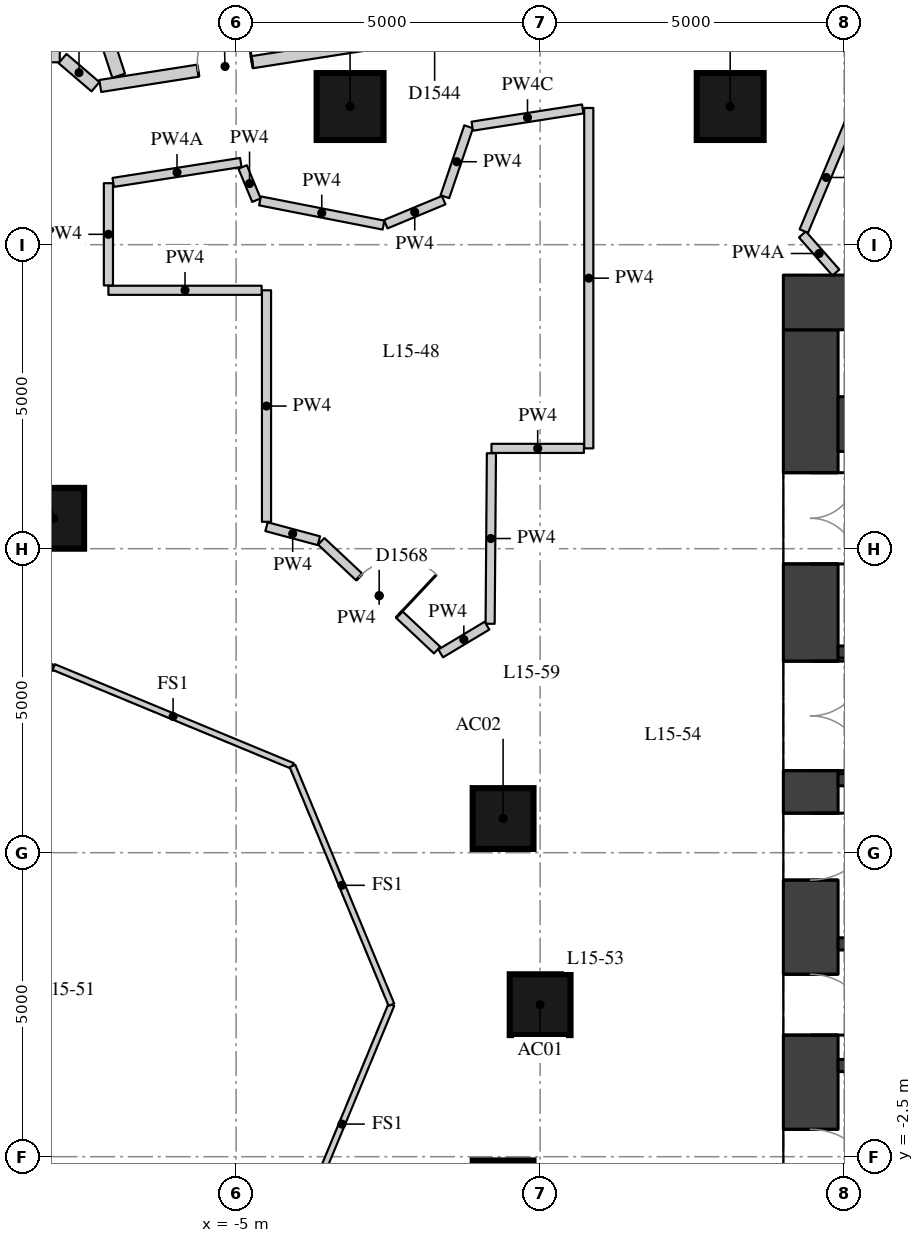
"""IFC4 building model, lengths in metres.
Left out: names, types, materials, properties, quantities, classifications, styles, units other than length and angle.
Written with IfcOpenShell. Run it as: python <this file> out.ifc"""

import sys

from ifc_helpers import new_model, si_unit, direction, frame, frame_2d, origin, origin_2d, place, context, subcontext, project, spatial, rectangle, extrude, element, fill, save


model = new_model("IFC4")
c1 = context("Model", 3, precision=1e-05, world=origin(), true_north=direction((0.0, 1.0)))
c2 = subcontext(c1, "Body", "Model", "MODEL_VIEW")
j1 = project(units=[si_unit("LENGTHUNIT", "METRE"), si_unit("PLANEANGLEUNIT", "RADIAN")], contexts=[c1])
p1 = place(None, origin())
s1 = spatial("IfcSite", under=j1, at=p1, CompositionType="ELEMENT")
p2 = place(p1, origin())
s2 = spatial("IfcBuilding", under=s1, at=p2, CompositionType="ELEMENT")
p3 = place(p2, frame((0.0, 0.0, 58.0)))
s3 = spatial("IfcBuildingStorey", under=s2, at=p3, CompositionType="ELEMENT", Elevation=58.0)
for number, where, z_axis, x_axis in (
    (1, (0.0, 0.0, 0.0), (0.0, 0.0, 1.0), (1.0, 0.0, 0.0)),
    (2, (-0.609, 3.062, 0.0), (0.0, 0.0, 1.0), (1.0, 0.0, 0.0)),
    (3, (-8.0, 8.0, 0.0), (0.0, 0.0, 1.0), (1.0, 0.0, 0.0)),
    (4, (-0.609, -3.062, 0.0), (0.0, 0.0, 1.0), (1.0, 0.0, 0.0)),
):
    element("IfcColumn", number, at=place(p3, frame(where, z_axis=z_axis, x_axis=x_axis)), inside=s3, PredefinedType="COLUMN", context=c2, shape_type="SweptSolid", body=[
        extrude(rectangle(XDim=1.0, YDim=1.0, at=origin_2d()), origin(), (0.0, 0.0, 1.0), 3.3),
    ])
for number, where, z_axis, x_axis in (
    (5, (3.126, 14.772, 0.0), (0.0, 0.0, 1.0), (1.0, 0.0, 0.0)),
    (6, (-3.126, 14.772, 0.0), (0.0, 0.0, 1.0), (1.0, 0.0, 0.0)),
):
    element("IfcColumn", number, at=place(p3, frame(where, z_axis=z_axis, x_axis=x_axis)), inside=s3, PredefinedType="COLUMN", context=c2, shape_type="SweptSolid", body=[
        extrude(rectangle(XDim=1.1, YDim=1.1, at=origin_2d()), origin(), (0.0, 0.0, 1.0), 3.3),
    ])
p4 = place(p3, frame((4.45, -11.1, 0.0), z_axis=(0.0, 0.0, 1.0), x_axis=(0.0, 1.0, 0.0)))
e7 = element("IfcWall", 7, at=p4, inside=s3, PredefinedType="SHEAR", context=c2, shape_type="SweptSolid", body=[
    extrude(rectangle(XDim=22.2, YDim=0.9, at=frame_2d((11.1, 0.0))), origin(), (0.0, 0.0, 1.0), 3.02),
])
p5 = place(p4, frame((2.35, 0.0, 0.0)))
e8 = element("IfcOpeningElement", 8, at=p5, cuts=e7, PredefinedType="OPENING", context=c2, shape_type="SweptSolid", body=[
    extrude(rectangle(XDim=1.5, YDim=2.1, at=frame_2d((0.75, 1.05))), frame((0.0, 0.46, 0.0), z_axis=(0.0, -1.0, 0.0), x_axis=(1.0, 0.0, 0.0)), (0.0, 0.0, 1.0), 0.92),
])
p6 = place(p4, frame((5.45, 0.0, 0.0)))
e9 = element("IfcOpeningElement", 9, at=p6, cuts=e7, PredefinedType="OPENING", context=c2, shape_type="SweptSolid", body=[
    extrude(rectangle(XDim=1.8, YDim=2.1, at=frame_2d((0.9, 1.05))), frame((0.0, 0.46, 0.0), z_axis=(0.0, -1.0, 0.0), x_axis=(1.0, 0.0, 0.0)), (0.0, 0.0, 1.0), 0.92),
])
p7 = place(p4, frame((7.95, 0.0, 0.0)))
e10 = element("IfcOpeningElement", 10, at=p7, cuts=e7, PredefinedType="OPENING", context=c2, shape_type="SweptSolid", body=[
    extrude(rectangle(XDim=1.1, YDim=2.1, at=frame_2d((0.55, 1.05))), frame((0.0, 0.46, 0.0), z_axis=(0.0, -1.0, 0.0), x_axis=(1.0, 0.0, 0.0)), (0.0, 0.0, 1.0), 0.92),
])
p8 = place(p4, frame((10.6, 0.0, 0.0)))
e11 = element("IfcOpeningElement", 11, at=p8, cuts=e7, PredefinedType="OPENING", context=c2, shape_type="SweptSolid", body=[
    extrude(rectangle(XDim=1.0, YDim=2.1, at=frame_2d((0.5, 1.05))), frame((0.0, 0.46, 0.0), z_axis=(0.0, -1.0, 0.0), x_axis=(1.0, 0.0, 0.0)), (0.0, 0.0, 1.0), 0.92),
])
p9 = place(p4, frame((13.15, 0.0, 0.0)))
e12 = element("IfcOpeningElement", 12, at=p9, cuts=e7, PredefinedType="OPENING", context=c2, shape_type="SweptSolid", body=[
    extrude(rectangle(XDim=1.1, YDim=2.1, at=frame_2d((0.55, 1.05))), frame((0.0, 0.46, 0.0), z_axis=(0.0, -1.0, 0.0), x_axis=(1.0, 0.0, 0.0)), (0.0, 0.0, 1.0), 0.92),
])
p10 = place(p4, frame((14.95, 0.0, 0.0)))
e13 = element("IfcOpeningElement", 13, at=p10, cuts=e7, PredefinedType="OPENING", context=c2, shape_type="SweptSolid", body=[
    extrude(rectangle(XDim=1.8, YDim=2.1, at=frame_2d((0.9, 1.05))), frame((0.0, 0.46, 0.0), z_axis=(0.0, -1.0, 0.0), x_axis=(1.0, 0.0, 0.0)), (0.0, 0.0, 1.0), 0.92),
])
p11 = place(p4, frame((18.35, 0.0, 0.0)))
e14 = element("IfcOpeningElement", 14, at=p11, cuts=e7, PredefinedType="OPENING", context=c2, shape_type="SweptSolid", body=[
    extrude(rectangle(XDim=1.5, YDim=2.1, at=frame_2d((0.75, 1.05))), frame((0.0, 0.46, 0.0), z_axis=(0.0, -1.0, 0.0), x_axis=(1.0, 0.0, 0.0)), (0.0, 0.0, 1.0), 0.92),
])
p12 = place(p3, frame((4.0, 11.55, 0.0), z_axis=(0.0, 0.0, 1.0), x_axis=(1.0, 0.0, 0.0)))
e15 = element("IfcWall", 15, at=p12, inside=s3, PredefinedType="SHEAR", context=c2, shape_type="SweptSolid", body=[
    extrude(rectangle(XDim=15.2, YDim=0.9, at=frame_2d((7.6, 0.0))), origin(), (0.0, 0.0, 1.0), 3.02),
])
p13 = place(p3, frame((4.9, 9.55, 0.0), z_axis=(0.0, 0.0, 1.0), x_axis=(1.0, 0.0, 0.0)))
e16 = element("IfcWall", 16, at=p13, inside=s3, PredefinedType="SHEAR", context=c2, shape_type="SweptSolid", body=[
    extrude(rectangle(XDim=10.2, YDim=0.9, at=frame_2d((5.1, 0.0))), origin(), (0.0, 0.0, 1.0), 3.02),
])
p14 = place(p3, frame((4.9, 5.8, 0.0), z_axis=(0.0, 0.0, 1.0), x_axis=(1.0, 0.0, 0.0)))
e17 = element("IfcWall", 17, at=p14, inside=s3, PredefinedType="SHEAR", context=c2, shape_type="SweptSolid", body=[
    extrude(rectangle(XDim=10.2, YDim=0.2, at=frame_2d((5.1, 0.0))), origin(), (0.0, 0.0, 1.0), 3.02),
])
p15 = place(p14, frame((6.75, 0.0, 0.0)))
e18 = element("IfcOpeningElement", 18, at=p15, cuts=e17, PredefinedType="OPENING", context=c2, shape_type="SweptSolid", body=[
    extrude(rectangle(XDim=1.1, YDim=2.1, at=frame_2d((0.55, 1.05))), frame((0.0, 0.11, 0.0), z_axis=(0.0, -1.0, 0.0), x_axis=(1.0, 0.0, 0.0)), (0.0, 0.0, 1.0), 0.22),
])
p16 = place(p14, frame((8.75, 0.0, 0.0)))
e19 = element("IfcOpeningElement", 19, at=p16, cuts=e17, PredefinedType="OPENING", context=c2, shape_type="SweptSolid", body=[
    extrude(rectangle(XDim=1.1, YDim=2.1, at=frame_2d((0.55, 1.05))), frame((0.0, 0.11, 0.0), z_axis=(0.0, -1.0, 0.0), x_axis=(1.0, 0.0, 0.0)), (0.0, 0.0, 1.0), 0.22),
])
p17 = place(p3, frame((4.9, 3.7, 0.0), z_axis=(0.0, 0.0, 1.0), x_axis=(1.0, 0.0, 0.0)))
e20 = element("IfcWall", 20, at=p17, inside=s3, PredefinedType="SHEAR", context=c2, shape_type="SweptSolid", body=[
    extrude(rectangle(XDim=10.2, YDim=0.2, at=frame_2d((5.1, 0.0))), origin(), (0.0, 0.0, 1.0), 3.02),
])
p18 = place(p17, frame((6.3, 0.0, 0.0)))
e21 = element("IfcOpeningElement", 21, at=p18, cuts=e20, PredefinedType="OPENING", context=c2, shape_type="SweptSolid", body=[
    extrude(rectangle(XDim=1.1, YDim=2.1, at=frame_2d((0.55, 1.05))), frame((0.0, 0.11, 0.0), z_axis=(0.0, -1.0, 0.0), x_axis=(1.0, 0.0, 0.0)), (0.0, 0.0, 1.0), 0.22),
])
p19 = place(p17, frame((8.6, 0.0, 0.0)))
e22 = element("IfcOpeningElement", 22, at=p19, cuts=e20, PredefinedType="OPENING", context=c2, shape_type="SweptSolid", body=[
    extrude(rectangle(XDim=1.1, YDim=2.1, at=frame_2d((0.55, 1.05))), frame((0.0, 0.11, 0.0), z_axis=(0.0, -1.0, 0.0), x_axis=(1.0, 0.0, 0.0)), (0.0, 0.0, 1.0), 0.22),
])
for number, where, z_axis, x_axis in (
    (23, (4.9, 1.0, 0.0), (0.0, 0.0, 1.0), (1.0, 0.0, 0.0)),
    (24, (4.9, -1.0, 0.0), (0.0, 0.0, 1.0), (1.0, 0.0, 0.0)),
):
    element("IfcWall", number, at=place(p3, frame(where, z_axis=z_axis, x_axis=x_axis)), inside=s3, PredefinedType="SHEAR", context=c2, shape_type="SweptSolid", body=[
        extrude(rectangle(XDim=10.2, YDim=0.2, at=frame_2d((5.1, 0.0))), origin(), (0.0, 0.0, 1.0), 3.02),
    ])
p20 = place(p3, frame((-15.531, 15.6, 0.0), z_axis=(0.0, 0.0, 1.0), x_axis=(1.0, 0.0, 0.0)))
e25 = element("IfcWall", 25, at=p20, inside=s3, PredefinedType="PARTITIONING", context=c2, shape_type="SweptSolid", body=[
    extrude(rectangle(XDim=7.632, YDim=0.2, at=frame_2d((3.816, 0.0))), origin(), (0.0, 0.0, 1.0), 3.02),
])
p21 = place(p20, frame((5.283, 0.0, 0.0)))
e26 = element("IfcOpeningElement", 26, at=p21, cuts=e25, PredefinedType="OPENING", context=c2, shape_type="SweptSolid", body=[
    extrude(rectangle(XDim=1.0, YDim=2.1, at=frame_2d((0.5, 1.05))), frame((0.0, 0.11, 0.0), z_axis=(0.0, -1.0, 0.0), x_axis=(1.0, 0.0, 0.0)), (0.0, 0.0, 1.0), 0.22),
])
p22 = place(p20, frame((0.451, 0.0, 0.0)))
e27 = element("IfcOpeningElement", 27, at=p22, cuts=e25, PredefinedType="OPENING", context=c2, shape_type="SweptSolid", body=[
    extrude(rectangle(XDim=1.1, YDim=2.1, at=frame_2d((0.55, 1.05))), frame((0.0, 0.11, 0.0), z_axis=(0.0, -1.0, 0.0), x_axis=(1.0, 0.0, 0.0)), (0.0, 0.0, 1.0), 0.22),
])
p23 = place(p3, frame((-7.854, 15.561, 0.0), z_axis=(0.0, 0.0, 1.0), x_axis=(0.759763914627, -0.650199041856, 0.0)))
e28 = element("IfcWall", 28, at=p23, inside=s3, PredefinedType="PARTITIONING", context=c2, shape_type="SweptSolid", body=[
    extrude(rectangle(XDim=0.713, YDim=0.2, at=frame_2d((0.356, 0.0))), origin(), (0.0, 0.0, 1.0), 3.02),
])
p24 = place(p3, frame((-7.234, 15.11, 0.0), z_axis=(0.0, 0.0, 1.0), x_axis=(0.987957763282, 0.154723811906, 0.0)))
e29 = element("IfcWall", 29, at=p24, inside=s3, PredefinedType="PARTITIONING", context=c2, shape_type="SweptSolid", body=[
    extrude(rectangle(XDim=11.012, YDim=0.2, at=frame_2d((5.506, 0.0))), origin(), (0.0, 0.0, 1.0), 3.02),
])
p25 = place(p24, frame((8.605, 0.0, 0.0)))
e30 = element("IfcOpeningElement", 30, at=p25, cuts=e29, PredefinedType="OPENING", context=c2, shape_type="SweptSolid", body=[
    extrude(rectangle(XDim=0.9, YDim=2.1, at=frame_2d((0.45, 1.05))), frame((0.0, 0.11, 0.0), z_axis=(0.0, -1.0, 0.0), x_axis=(1.0, 0.0, 0.0)), (0.0, 0.0, 1.0), 0.22),
])
p26 = place(p24, frame((5.116, 0.0, 0.0)))
e31 = element("IfcOpeningElement", 31, at=p26, cuts=e29, PredefinedType="OPENING", context=c2, shape_type="SweptSolid", body=[
    extrude(rectangle(XDim=0.9, YDim=2.1, at=frame_2d((0.45, 1.05))), frame((0.0, 0.11, 0.0), z_axis=(0.0, -1.0, 0.0), x_axis=(1.0, 0.0, 0.0)), (0.0, 0.0, 1.0), 0.22),
])
p27 = place(p24, frame((1.626, 0.0, 0.0)))
e32 = element("IfcOpeningElement", 32, at=p27, cuts=e29, PredefinedType="OPENING", context=c2, shape_type="SweptSolid", body=[
    extrude(rectangle(XDim=0.9, YDim=2.1, at=frame_2d((0.45, 1.05))), frame((0.0, 0.11, 0.0), z_axis=(0.0, -1.0, 0.0), x_axis=(1.0, 0.0, 0.0)), (0.0, 0.0, 1.0), 0.22),
])
p28 = place(p3, frame((3.739, 16.776, 0.0), z_axis=(0.0, 0.0, 1.0), x_axis=(0.923364778497, -0.383923802117, 0.0)))
e33 = element("IfcWall", 33, at=p28, inside=s3, PredefinedType="PARTITIONING", context=c2, shape_type="SweptSolid", body=[
    extrude(rectangle(XDim=8.273, YDim=0.2, at=frame_2d((4.137, 0.0))), origin(), (0.0, 0.0, 1.0), 3.02),
])
p29 = place(p28, frame((6.153, 0.0, 0.0)))
e34 = element("IfcOpeningElement", 34, at=p29, cuts=e33, PredefinedType="OPENING", context=c2, shape_type="SweptSolid", body=[
    extrude(rectangle(XDim=1.1, YDim=2.1, at=frame_2d((0.55, 1.05))), frame((0.0, 0.11, 0.0), z_axis=(0.0, -1.0, 0.0), x_axis=(1.0, 0.0, 0.0)), (0.0, 0.0, 1.0), 0.22),
])
p30 = place(p28, frame((1.298, 0.0, 0.0)))
e35 = element("IfcOpeningElement", 35, at=p30, cuts=e33, PredefinedType="OPENING", context=c2, shape_type="SweptSolid", body=[
    extrude(rectangle(XDim=0.9, YDim=2.1, at=frame_2d((0.45, 1.05))), frame((0.0, 0.11, 0.0), z_axis=(0.0, -1.0, 0.0), x_axis=(1.0, 0.0, 0.0)), (0.0, 0.0, 1.0), 0.22),
])
p31 = place(p3, frame((0.8, 14.749, 0.0), z_axis=(0.0, 0.0, 1.0), x_axis=(0.0, -1.0, 0.0)))
e36 = element("IfcWall", 36, at=p31, inside=s3, PredefinedType="PARTITIONING", context=c2, shape_type="SweptSolid", body=[
    extrude(rectangle(XDim=5.599, YDim=0.15, at=frame_2d((2.799, 0.0))), origin(), (0.0, 0.0, 1.0), 3.02),
])
p32 = place(p3, frame((0.72, 9.15, 0.0), z_axis=(0.0, 0.0, 1.0), x_axis=(-1.0, 0.0, 0.0)))
e37 = element("IfcWall", 37, at=p32, inside=s3, PredefinedType="PARTITIONING", context=c2, shape_type="SweptSolid", body=[
    extrude(rectangle(XDim=1.52, YDim=0.15, at=frame_2d((0.76, 0.0))), origin(), (0.0, 0.0, 1.0), 3.02),
])
p33 = place(p3, frame((-0.801, 9.07, 0.0), z_axis=(0.0, 0.0, 1.0), x_axis=(-0.007572902619, -0.999971325162, 0.0)))
e38 = element("IfcWall", 38, at=p33, inside=s3, PredefinedType="PARTITIONING", context=c2, shape_type="SweptSolid", body=[
    extrude(rectangle(XDim=2.805, YDim=0.15, at=frame_2d((1.402, 0.0))), origin(), (0.0, 0.0, 1.0), 3.02),
])
p34 = place(p3, frame((-0.874, 6.234, 0.0), z_axis=(0.0, 0.0, 1.0), x_axis=(-0.857759476535, -0.514051242984, 0.0)))
e39 = element("IfcWall", 39, at=p34, inside=s3, PredefinedType="PARTITIONING", context=c2, shape_type="SweptSolid", body=[
    extrude(rectangle(XDim=0.889, YDim=0.15, at=frame_2d((0.444, 0.0))), origin(), (0.0, 0.0, 1.0), 3.02),
])
p35 = place(p3, frame((-1.694, 5.832, 0.0), z_axis=(0.0, 0.0, 1.0), x_axis=(-0.729170056034, 0.684332542981, 0.0)))
e40 = element("IfcWall", 40, at=p35, inside=s3, PredefinedType="PARTITIONING", context=c2, shape_type="SweptSolid", body=[
    extrude(rectangle(XDim=2.614, YDim=0.15, at=frame_2d((1.307, 0.0))), origin(), (0.0, 0.0, 1.0), 3.02),
])
p36 = place(p35, frame((0.857, 0.0, 0.0)))
e41 = element("IfcOpeningElement", 41, at=p36, cuts=e40, PredefinedType="OPENING", context=c2, shape_type="SweptSolid", body=[
    extrude(rectangle(XDim=0.9, YDim=2.1, at=frame_2d((0.45, 1.05))), frame((0.0, 0.085, 0.0), z_axis=(0.0, -1.0, 0.0), x_axis=(1.0, 0.0, 0.0)), (0.0, 0.0, 1.0), 0.17),
])
p37 = place(p3, frame((-3.639, 7.631, 0.0), z_axis=(0.0, 0.0, 1.0), x_axis=(-0.965879594242, 0.258991523853, 0.0)))
e42 = element("IfcWall", 42, at=p37, inside=s3, PredefinedType="PARTITIONING", context=c2, shape_type="SweptSolid", body=[
    extrude(rectangle(XDim=0.892, YDim=0.15, at=frame_2d((0.446, 0.0))), origin(), (0.0, 0.0, 1.0), 3.02),
])
p38 = place(p3, frame((-4.5, 7.942, 0.0), z_axis=(0.0, 0.0, 1.0), x_axis=(0.0, 1.0, 0.0)))
e43 = element("IfcWall", 43, at=p38, inside=s3, PredefinedType="PARTITIONING", context=c2, shape_type="SweptSolid", body=[
    extrude(rectangle(XDim=3.808, YDim=0.15, at=frame_2d((1.904, 0.0))), origin(), (0.0, 0.0, 1.0), 3.02),
])
p39 = place(p3, frame((-4.58, 11.75, 0.0), z_axis=(0.0, 0.0, 1.0), x_axis=(-1.0, 0.0, 0.0)))
e44 = element("IfcWall", 44, at=p39, inside=s3, PredefinedType="PARTITIONING", context=c2, shape_type="SweptSolid", body=[
    extrude(rectangle(XDim=2.52, YDim=0.15, at=frame_2d((1.26, 0.0))), origin(), (0.0, 0.0, 1.0), 3.02),
])
p40 = place(p3, frame((-7.1, 11.83, 0.0), z_axis=(0.0, 0.0, 1.0), x_axis=(0.0, 1.0, 0.0)))
e45 = element("IfcWall", 45, at=p40, inside=s3, PredefinedType="PARTITIONING", context=c2, shape_type="SweptSolid", body=[
    extrude(rectangle(XDim=1.681, YDim=0.15, at=frame_2d((0.841, 0.0))), origin(), (0.0, 0.0, 1.0), 3.02),
])
p41 = place(p3, frame((-7.021, 13.524, 0.0), z_axis=(0.0, 0.0, 1.0), x_axis=(0.987976394461, 0.154604799366, 0.0)))
e46 = element("IfcWall", 46, at=p41, inside=s3, PredefinedType="PARTITIONING", context=c2, shape_type="SweptSolid", body=[
    extrude(rectangle(XDim=2.124, YDim=0.15, at=frame_2d((1.062, 0.0))), origin(), (0.0, 0.0, 1.0), 2.57),
])
p42 = place(p3, frame((-4.892, 13.778, 0.0), z_axis=(0.0, 0.0, 1.0), x_axis=(0.383178293395, -0.923674399056, 0.0)))
e47 = element("IfcWall", 47, at=p42, inside=s3, PredefinedType="PARTITIONING", context=c2, shape_type="SweptSolid", body=[
    extrude(rectangle(XDim=0.591, YDim=0.15, at=frame_2d((0.296, 0.0))), origin(), (0.0, 0.0, 1.0), 3.02),
])
p43 = place(p3, frame((-4.607, 13.22, 0.0), z_axis=(0.0, 0.0, 1.0), x_axis=(0.981304142817, -0.192463449234, 0.0)))
e48 = element("IfcWall", 48, at=p43, inside=s3, PredefinedType="PARTITIONING", context=c2, shape_type="SweptSolid", body=[
    extrude(rectangle(XDim=2.07, YDim=0.15, at=frame_2d((1.035, 0.0))), origin(), (0.0, 0.0, 1.0), 3.02),
])
p44 = place(p3, frame((-2.539, 12.837, 0.0), z_axis=(0.0, 0.0, 1.0), x_axis=(0.923768662954, 0.382950985565, 0.0)))
e49 = element("IfcWall", 49, at=p44, inside=s3, PredefinedType="PARTITIONING", context=c2, shape_type="SweptSolid", body=[
    extrude(rectangle(XDim=1.031, YDim=0.15, at=frame_2d((0.516, 0.0))), origin(), (0.0, 0.0, 1.0), 3.02),
])
p45 = place(p3, frame((-1.567, 13.289, 0.0), z_axis=(0.0, 0.0, 1.0), x_axis=(0.321769415776, 0.946818062286, 0.0)))
e50 = element("IfcWall", 50, at=p45, inside=s3, PredefinedType="PARTITIONING", context=c2, shape_type="SweptSolid", body=[
    extrude(rectangle(XDim=1.215, YDim=0.15, at=frame_2d((0.607, 0.0))), origin(), (0.0, 0.0, 1.0), 3.02),
])
p46 = place(p3, frame((-1.116, 14.449, 0.0), z_axis=(0.0, 0.0, 1.0), x_axis=(0.988017726025, 0.154340445315, 0.0)))
e51 = element("IfcWall", 51, at=p46, inside=s3, PredefinedType="PARTITIONING", context=c2, shape_type="SweptSolid", body=[
    extrude(rectangle(XDim=1.84, YDim=0.15, at=frame_2d((0.92, 0.0))), origin(), (0.0, 0.0, 1.0), 2.42),
])
p47 = place(p3, frame((4.865, 12.042, 0.0), z_axis=(0.0, 0.0, 1.0), x_axis=(-0.660014599896, 0.751252772323, 0.0)))
e52 = element("IfcWall", 52, at=p47, inside=s3, PredefinedType="PARTITIONING", context=c2, shape_type="SweptSolid", body=[
    extrude(rectangle(XDim=0.835, YDim=0.15, at=frame_2d((0.417, 0.0))), origin(), (0.0, 0.0, 1.0), 2.57),
])
p48 = place(p3, frame((4.337, 12.724, 0.0), z_axis=(0.0, 0.0, 1.0), x_axis=(0.386537433901, 0.922273718694, 0.0)))
e53 = element("IfcWall", 53, at=p48, inside=s3, PredefinedType="PARTITIONING", context=c2, shape_type="SweptSolid", body=[
    extrude(rectangle(XDim=1.911, YDim=0.15, at=frame_2d((0.956, 0.0))), origin(), (0.0, 0.0, 1.0), 3.02),
])
p49 = place(p3, frame((-9.034, 21.721, 0.0), z_axis=(0.0, 0.0, 1.0), x_axis=(0.310212430052, -0.950667264736, 0.0)))
e54 = element("IfcWall", 54, at=p49, inside=s3, PredefinedType="PARTITIONING", context=c2, shape_type="SweptSolid", body=[
    extrude(rectangle(XDim=6.777, YDim=0.22, at=frame_2d((3.388, 0.0))), origin(), (0.0, 0.0, 1.0), 3.02),
])
for number, where, z_axis, x_axis in (
    (55, (-2.446, 0.0, 0.0), (0.0, 0.0, 1.0), (-0.383, -0.924, 0.0)),
    (56, (-11.927, 3.927, 0.0), (0.0, 0.0, 1.0), (0.924, 0.383, 0.0)),
    (57, (-8.0, 5.554, 0.0), (0.0, 0.0, 1.0), (0.924, -0.383, 0.0)),
    (58, (-4.073, 3.927, 0.0), (0.0, 0.0, 1.0), (0.383, -0.924, 0.0)),
):
    element("IfcWall", number, at=place(p3, frame(where, z_axis=z_axis, x_axis=x_axis)), inside=s3, PredefinedType="PARTITIONING", context=c2, shape_type="SweptSolid", body=[
        extrude(rectangle(XDim=4.251, YDim=0.1, at=frame_2d((2.125, 0.0))), origin(), (0.0, 0.0, 1.0), 3.02),
    ])
p50 = place(p7, origin())
e59 = element("IfcDoor", 59, at=p50, inside=s3, OperationType="SINGLE_SWING_RIGHT", PredefinedType="DOOR", context=c2, shape_type="SweptSolid", body=[
    extrude(rectangle(XDim=1.1, YDim=2.1, at=frame_2d((0.55, 1.05))), frame((0.0, 0.025, 0.0), z_axis=(0.0, -1.0, 0.0), x_axis=(1.0, 0.0, 0.0)), (0.0, 0.0, 1.0), 0.05),
])
fill(e10, e59)
p51 = place(p8, origin())
e60 = element("IfcDoor", 60, at=p51, inside=s3, OperationType="SINGLE_SWING_RIGHT", PredefinedType="DOOR", context=c2, shape_type="SweptSolid", body=[
    extrude(rectangle(XDim=1.0, YDim=2.1, at=frame_2d((0.5, 1.05))), frame((0.0, 0.025, 0.0), z_axis=(0.0, -1.0, 0.0), x_axis=(1.0, 0.0, 0.0)), (0.0, 0.0, 1.0), 0.05),
])
fill(e11, e60)
p52 = place(p9, origin())
e61 = element("IfcDoor", 61, at=p52, inside=s3, OperationType="SINGLE_SWING_LEFT", PredefinedType="DOOR", context=c2, shape_type="SweptSolid", body=[
    extrude(rectangle(XDim=1.1, YDim=2.1, at=frame_2d((0.55, 1.05))), frame((0.0, 0.025, 0.0), z_axis=(0.0, -1.0, 0.0), x_axis=(1.0, 0.0, 0.0)), (0.0, 0.0, 1.0), 0.05),
])
fill(e12, e61)
p53 = place(p10, origin())
e62 = element("IfcDoor", 62, at=p53, inside=s3, OperationType="DOUBLE_DOOR_SINGLE_SWING", PredefinedType="DOOR", context=c2, shape_type="SweptSolid", body=[
    extrude(rectangle(XDim=1.8, YDim=2.1, at=frame_2d((0.9, 1.05))), frame((0.0, 0.025, 0.0), z_axis=(0.0, -1.0, 0.0), x_axis=(1.0, 0.0, 0.0)), (0.0, 0.0, 1.0), 0.05),
])
fill(e13, e62)
p54 = place(p11, origin())
e63 = element("IfcDoor", 63, at=p54, inside=s3, OperationType="DOUBLE_DOOR_SINGLE_SWING", PredefinedType="DOOR", context=c2, shape_type="SweptSolid", body=[
    extrude(rectangle(XDim=1.5, YDim=2.1, at=frame_2d((0.75, 1.05))), frame((0.0, 0.025, 0.0), z_axis=(0.0, -1.0, 0.0), x_axis=(1.0, 0.0, 0.0)), (0.0, 0.0, 1.0), 0.05),
])
fill(e14, e63)
p55 = place(p27, origin())
e64 = element("IfcDoor", 64, at=p55, inside=s3, OperationType="SINGLE_SWING_RIGHT", PredefinedType="DOOR", context=c2, shape_type="SweptSolid", body=[
    extrude(rectangle(XDim=0.9, YDim=2.1, at=frame_2d((0.45, 1.05))), frame((0.0, 0.025, 0.0), z_axis=(0.0, -1.0, 0.0), x_axis=(1.0, 0.0, 0.0)), (0.0, 0.0, 1.0), 0.05),
])
fill(e32, e64)
p56 = place(p36, origin())
e65 = element("IfcDoor", 65, at=p56, inside=s3, OperationType="SINGLE_SWING_RIGHT", PredefinedType="DOOR", context=c2, shape_type="SweptSolid", body=[
    extrude(rectangle(XDim=0.9, YDim=2.1, at=frame_2d((0.45, 1.05))), frame((0.0, 0.025, 0.0), z_axis=(0.0, -1.0, 0.0), x_axis=(1.0, 0.0, 0.0)), (0.0, 0.0, 1.0), 0.05),
])
fill(e41, e65)
save(model, sys.argv[1])
